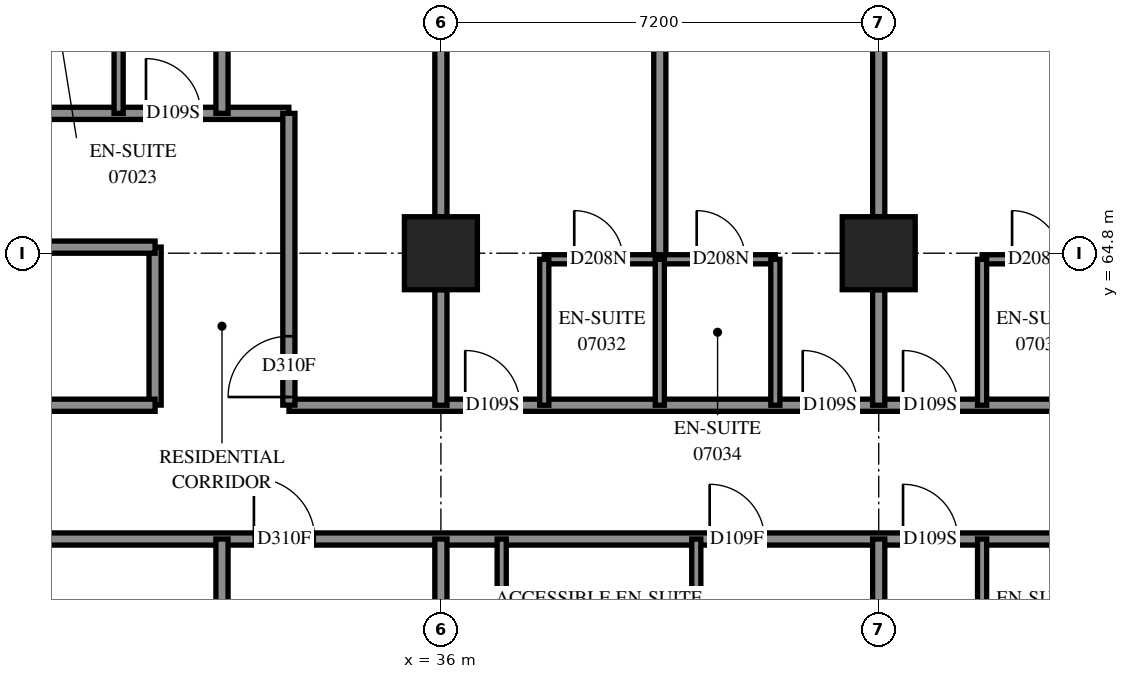
"""IFC4 building model, lengths in metres.
Left out: names, types, materials, properties, quantities, classifications, styles, units other than length and angle.
Written with IfcOpenShell. Run it as: python <this file> out.ifc"""

import sys

from ifc_helpers import new_model, si_unit, direction, frame, frame_2d, origin, origin_2d, place, context, subcontext, project, spatial, rectangle, extrude, element, fill, save


model = new_model("IFC4")
c1 = context("Model", 3, precision=1e-05, world=origin(), true_north=direction((0.0, 1.0)))
c2 = subcontext(c1, "Body", "Model", "MODEL_VIEW")
j1 = project(units=[si_unit("LENGTHUNIT", "METRE"), si_unit("PLANEANGLEUNIT", "RADIAN")], contexts=[c1])
p1 = place(None, origin())
s1 = spatial("IfcSite", under=j1, at=p1, CompositionType="ELEMENT")
p2 = place(p1, origin())
s2 = spatial("IfcBuilding", under=s1, at=p2, CompositionType="ELEMENT")
p3 = place(p2, frame((0.0, 0.0, 30.4)))
s3 = spatial("IfcBuildingStorey", under=s2, at=p3, CompositionType="ELEMENT", Elevation=30.4)
for number, where, z_axis, x_axis in (
    (1, (36.0, 64.8, 0.0), (0.0, 0.0, 1.0), (1.0, 0.0, 0.0)),
    (2, (43.2, 64.8, 0.0), (0.0, 0.0, 1.0), (1.0, 0.0, 0.0)),
):
    element("IfcColumn", number, at=place(p3, frame(where, z_axis=z_axis, x_axis=x_axis)), inside=s3, PredefinedType="COLUMN", context=c2, shape_type="SweptSolid", body=[
        extrude(rectangle(XDim=1.2, YDim=1.2, at=origin_2d()), origin(), (0.0, 0.0, 1.0), 3.1),
    ])
p4 = place(p3, frame((28.8, 60.1, 0.0), z_axis=(0.0, 0.0, 1.0), x_axis=(1.0, 0.0, 0.0)))
e3 = element("IfcWall", 3, at=p4, inside=s3, PredefinedType="PARTITIONING", context=c2, shape_type="SweptSolid", body=[
    extrude(rectangle(XDim=24.1, YDim=0.2, at=frame_2d((12.05, 0.0))), origin(), (0.0, 0.0, 1.0), 3.1),
])
p5 = place(p4, frame((4.125, 0.0, 0.0)))
e4 = element("IfcOpeningElement", 4, at=p5, cuts=e3, PredefinedType="OPENING", context=c2, shape_type="SweptSolid", body=[
    extrude(rectangle(XDim=1.0, YDim=2.1, at=frame_2d((0.5, 1.05))), frame((0.0, 0.11, 0.0), z_axis=(0.0, -1.0, 0.0), x_axis=(1.0, 0.0, 0.0)), (0.0, 0.0, 1.0), 0.22),
])
p6 = place(p4, frame((11.62, 0.0, 0.0)))
e5 = element("IfcOpeningElement", 5, at=p6, cuts=e3, PredefinedType="OPENING", context=c2, shape_type="SweptSolid", body=[
    extrude(rectangle(XDim=0.9, YDim=2.1, at=frame_2d((0.45, 1.05))), frame((0.0, 0.11, 0.0), z_axis=(0.0, -1.0, 0.0), x_axis=(1.0, 0.0, 0.0)), (0.0, 0.0, 1.0), 0.22),
])
p7 = place(p4, frame((14.8, 0.0, 0.0)))
e6 = element("IfcOpeningElement", 6, at=p7, cuts=e3, PredefinedType="OPENING", context=c2, shape_type="SweptSolid", body=[
    extrude(rectangle(XDim=0.9, YDim=2.1, at=frame_2d((0.45, 1.05))), frame((0.0, 0.11, 0.0), z_axis=(0.0, -1.0, 0.0), x_axis=(1.0, 0.0, 0.0)), (0.0, 0.0, 1.0), 0.22),
])
p8 = place(p4, frame((18.835, 0.0, 0.0)))
e7 = element("IfcOpeningElement", 7, at=p8, cuts=e3, PredefinedType="OPENING", context=c2, shape_type="SweptSolid", body=[
    extrude(rectangle(XDim=1.0, YDim=2.1, at=frame_2d((0.5, 1.05))), frame((0.0, 0.11, 0.0), z_axis=(0.0, -1.0, 0.0), x_axis=(1.0, 0.0, 0.0)), (0.0, 0.0, 1.0), 0.22),
])
p9 = place(p4, frame((22.854, 0.0, 0.0)))
e8 = element("IfcOpeningElement", 8, at=p9, cuts=e3, PredefinedType="OPENING", context=c2, shape_type="SweptSolid", body=[
    extrude(rectangle(XDim=1.0, YDim=2.1, at=frame_2d((0.5, 1.05))), frame((0.0, 0.11, 0.0), z_axis=(0.0, -1.0, 0.0), x_axis=(1.0, 0.0, 0.0)), (0.0, 0.0, 1.0), 0.22),
])
p10 = place(p3, frame((33.502, 62.3, 0.0), z_axis=(0.0, 0.0, 1.0), x_axis=(1.0, 0.0, 0.0)))
e9 = element("IfcWall", 9, at=p10, inside=s3, PredefinedType="PARTITIONING", context=c2, shape_type="SweptSolid", body=[
    extrude(rectangle(XDim=20.998, YDim=0.2, at=frame_2d((10.499, 0.0))), origin(), (0.0, 0.0, 1.0), 3.1),
])
p11 = place(p10, frame((2.898, 0.0, 0.0)))
e10 = element("IfcOpeningElement", 10, at=p11, cuts=e9, PredefinedType="OPENING", context=c2, shape_type="SweptSolid", body=[
    extrude(rectangle(XDim=0.9, YDim=2.1, at=frame_2d((0.45, 1.05))), frame((0.0, 0.11, 0.0), z_axis=(0.0, -1.0, 0.0), x_axis=(1.0, 0.0, 0.0)), (0.0, 0.0, 1.0), 0.22),
])
p12 = place(p10, frame((8.448, 0.0, 0.0)))
e11 = element("IfcOpeningElement", 11, at=p12, cuts=e9, PredefinedType="OPENING", context=c2, shape_type="SweptSolid", body=[
    extrude(rectangle(XDim=0.9, YDim=2.1, at=frame_2d((0.45, 1.05))), frame((0.0, 0.11, 0.0), z_axis=(0.0, -1.0, 0.0), x_axis=(1.0, 0.0, 0.0)), (0.0, 0.0, 1.0), 0.22),
])
p13 = place(p10, frame((10.098, 0.0, 0.0)))
e12 = element("IfcOpeningElement", 12, at=p13, cuts=e9, PredefinedType="OPENING", context=c2, shape_type="SweptSolid", body=[
    extrude(rectangle(XDim=0.9, YDim=2.1, at=frame_2d((0.45, 1.05))), frame((0.0, 0.11, 0.0), z_axis=(0.0, -1.0, 0.0), x_axis=(1.0, 0.0, 0.0)), (0.0, 0.0, 1.0), 0.22),
])
p14 = place(p10, frame((15.648, 0.0, 0.0)))
e13 = element("IfcOpeningElement", 13, at=p14, cuts=e9, PredefinedType="OPENING", context=c2, shape_type="SweptSolid", body=[
    extrude(rectangle(XDim=0.9, YDim=2.1, at=frame_2d((0.45, 1.05))), frame((0.0, 0.11, 0.0), z_axis=(0.0, -1.0, 0.0), x_axis=(1.0, 0.0, 0.0)), (0.0, 0.0, 1.0), 0.22),
])
p15 = place(p10, frame((17.298, 0.0, 0.0)))
e14 = element("IfcOpeningElement", 14, at=p15, cuts=e9, PredefinedType="OPENING", context=c2, shape_type="SweptSolid", body=[
    extrude(rectangle(XDim=0.9, YDim=2.1, at=frame_2d((0.45, 1.05))), frame((0.0, 0.11, 0.0), z_axis=(0.0, -1.0, 0.0), x_axis=(1.0, 0.0, 0.0)), (0.0, 0.0, 1.0), 0.22),
])
p16 = place(p3, frame((21.602, 67.1, 0.0), z_axis=(0.0, 0.0, 1.0), x_axis=(1.0, 0.0, 0.0)))
e15 = element("IfcWall", 15, at=p16, inside=s3, PredefinedType="PARTITIONING", context=c2, shape_type="SweptSolid", body=[
    extrude(rectangle(XDim=11.898, YDim=0.2, at=frame_2d((5.949, 0.0))), origin(), (0.0, 0.0, 1.0), 3.1),
])
p17 = place(p16, frame((1.798, 0.0, 0.0)))
e16 = element("IfcOpeningElement", 16, at=p17, cuts=e15, PredefinedType="OPENING", context=c2, shape_type="SweptSolid", body=[
    extrude(rectangle(XDim=1.0, YDim=2.1, at=frame_2d((0.5, 1.05))), frame((0.0, 0.11, 0.0), z_axis=(0.0, -1.0, 0.0), x_axis=(1.0, 0.0, 0.0)), (0.0, 0.0, 1.0), 0.22),
])
p18 = place(p16, frame((3.998, 0.0, 0.0)))
e17 = element("IfcOpeningElement", 17, at=p18, cuts=e15, PredefinedType="OPENING", context=c2, shape_type="SweptSolid", body=[
    extrude(rectangle(XDim=0.9, YDim=2.1, at=frame_2d((0.45, 1.05))), frame((0.0, 0.11, 0.0), z_axis=(0.0, -1.0, 0.0), x_axis=(1.0, 0.0, 0.0)), (0.0, 0.0, 1.0), 0.22),
])
p19 = place(p16, frame((9.548, 0.0, 0.0)))
e18 = element("IfcOpeningElement", 18, at=p19, cuts=e15, PredefinedType="OPENING", context=c2, shape_type="SweptSolid", body=[
    extrude(rectangle(XDim=0.9, YDim=2.1, at=frame_2d((0.45, 1.05))), frame((0.0, 0.11, 0.0), z_axis=(0.0, -1.0, 0.0), x_axis=(1.0, 0.0, 0.0)), (0.0, 0.0, 1.0), 0.22),
])
p20 = place(p3, frame((39.6, 64.7, 0.0), z_axis=(0.0, 0.0, 1.0), x_axis=(0.0, 1.0, 0.0)))
e19 = element("IfcWall", 19, at=p20, inside=s3, PredefinedType="PARTITIONING", context=c2, shape_type="SweptSolid", body=[
    extrude(rectangle(XDim=8.052, YDim=0.2, at=frame_2d((4.026, 0.0))), origin(), (0.0, 0.0, 1.0), 3.1),
])
for number, where, z_axis, x_axis in (
    (20, (36.0, 65.4, 0.0), (0.0, 0.0, 1.0), (0.0, 1.0, 0.0)),
    (21, (43.2, 65.4, 0.0), (0.0, 0.0, 1.0), (0.0, 1.0, 0.0)),
):
    element("IfcWall", number, at=place(p3, frame(where, z_axis=z_axis, x_axis=x_axis)), inside=s3, PredefinedType="PARTITIONING", context=c2, shape_type="SweptSolid", body=[
        extrude(rectangle(XDim=6.0, YDim=0.2, at=frame_2d((3.0, 0.0))), origin(), (0.0, 0.0, 1.0), 3.1),
    ])
p21 = place(p3, frame((32.4, 67.1, 0.0), z_axis=(0.0, 0.0, 1.0), x_axis=(0.0, 1.0, 0.0)))
e22 = element("IfcWall", 22, at=p21, inside=s3, PredefinedType="PARTITIONING", context=c2, shape_type="SweptSolid", body=[
    extrude(rectangle(XDim=5.684, YDim=0.2, at=frame_2d((2.842, 0.0))), origin(), (0.0, 0.0, 1.0), 3.1),
])
p22 = place(p3, frame((33.5, 62.302, 0.0), z_axis=(0.0, 0.0, 1.0), x_axis=(0.0, 1.0, 0.0)))
e23 = element("IfcWall", 23, at=p22, inside=s3, PredefinedType="PARTITIONING", context=c2, shape_type="SweptSolid", body=[
    extrude(rectangle(XDim=4.798, YDim=0.2, at=frame_2d((2.399, 0.0))), origin(), (0.0, 0.0, 1.0), 3.1),
])
p23 = place(p22, frame((0.133, 0.0, 0.0)))
e24 = element("IfcOpeningElement", 24, at=p23, cuts=e23, PredefinedType="OPENING", context=c2, shape_type="SweptSolid", body=[
    extrude(rectangle(XDim=1.0, YDim=2.1, at=frame_2d((0.5, 1.05))), frame((0.0, 0.11, 0.0), z_axis=(0.0, -1.0, 0.0), x_axis=(1.0, 0.0, 0.0)), (0.0, 0.0, 1.0), 0.22),
])
p24 = place(p3, frame((44.9, 64.7, 0.0), z_axis=(0.0, 0.0, 1.0), x_axis=(1.0, 0.0, 0.0)))
e25 = element("IfcWall", 25, at=p24, inside=s3, PredefinedType="PARTITIONING", context=c2, shape_type="SweptSolid", body=[
    extrude(rectangle(XDim=3.8, YDim=0.15, at=frame_2d((1.9, 0.0))), origin(), (0.0, 0.0, 1.0), 3.1),
])
p25 = place(p24, frame((0.493, 0.0, 0.0)))
e26 = element("IfcOpeningElement", 26, at=p25, cuts=e25, PredefinedType="OPENING", context=c2, shape_type="SweptSolid", body=[
    extrude(rectangle(XDim=0.8, YDim=2.1, at=frame_2d((0.4, 1.05))), frame((0.0, 0.085, 0.0), z_axis=(0.0, -1.0, 0.0), x_axis=(1.0, 0.0, 0.0)), (0.0, 0.0, 1.0), 0.17),
])
p26 = place(p24, frame((2.507, 0.0, 0.0)))
e27 = element("IfcOpeningElement", 27, at=p26, cuts=e25, PredefinedType="OPENING", context=c2, shape_type="SweptSolid", body=[
    extrude(rectangle(XDim=0.8, YDim=2.1, at=frame_2d((0.4, 1.05))), frame((0.0, 0.085, 0.0), z_axis=(0.0, -1.0, 0.0), x_axis=(1.0, 0.0, 0.0)), (0.0, 0.0, 1.0), 0.17),
])
p27 = place(p3, frame((37.7, 64.7, 0.0), z_axis=(0.0, 0.0, 1.0), x_axis=(1.0, 0.0, 0.0)))
e28 = element("IfcWall", 28, at=p27, inside=s3, PredefinedType="PARTITIONING", context=c2, shape_type="SweptSolid", body=[
    extrude(rectangle(XDim=3.8, YDim=0.15, at=frame_2d((1.9, 0.0))), origin(), (0.0, 0.0, 1.0), 3.1),
])
p28 = place(p27, frame((0.493, 0.0, 0.0)))
e29 = element("IfcOpeningElement", 29, at=p28, cuts=e28, PredefinedType="OPENING", context=c2, shape_type="SweptSolid", body=[
    extrude(rectangle(XDim=0.8, YDim=2.1, at=frame_2d((0.4, 1.05))), frame((0.0, 0.085, 0.0), z_axis=(0.0, -1.0, 0.0), x_axis=(1.0, 0.0, 0.0)), (0.0, 0.0, 1.0), 0.17),
])
p29 = place(p27, frame((2.507, 0.0, 0.0)))
e30 = element("IfcOpeningElement", 30, at=p29, cuts=e28, PredefinedType="OPENING", context=c2, shape_type="SweptSolid", body=[
    extrude(rectangle(XDim=0.8, YDim=2.1, at=frame_2d((0.4, 1.05))), frame((0.0, 0.085, 0.0), z_axis=(0.0, -1.0, 0.0), x_axis=(1.0, 0.0, 0.0)), (0.0, 0.0, 1.0), 0.17),
])
p30 = place(p3, frame((32.4, 56.95, 0.0), z_axis=(0.0, 0.0, 1.0), x_axis=(0.0, 1.0, 0.0)))
e31 = element("IfcWall", 31, at=p30, inside=s3, PredefinedType="PARTITIONING", context=c2, shape_type="SweptSolid", body=[
    extrude(rectangle(XDim=3.15, YDim=0.2, at=frame_2d((1.575, 0.0))), origin(), (0.0, 0.0, 1.0), 3.1),
])
p31 = place(p3, frame((31.3, 62.302, 0.0), z_axis=(0.0, 0.0, 1.0), x_axis=(0.0, 1.0, 0.0)))
e32 = element("IfcWall", 32, at=p31, inside=s3, PredefinedType="PARTITIONING", context=c2, shape_type="SweptSolid", body=[
    extrude(rectangle(XDim=2.598, YDim=0.2, at=frame_2d((1.299, 0.0))), origin(), (0.0, 0.0, 1.0), 3.1),
])
p32 = place(p3, frame((28.802, 62.3, 0.0), z_axis=(0.0, 0.0, 1.0), x_axis=(1.0, 0.0, 0.0)))
e33 = element("IfcWall", 33, at=p32, inside=s3, PredefinedType="PARTITIONING", context=c2, shape_type="SweptSolid", body=[
    extrude(rectangle(XDim=2.498, YDim=0.2, at=frame_2d((1.249, 0.0))), origin(), (0.0, 0.0, 1.0), 3.1),
])
for number, where, z_axis, x_axis in (
    (34, (30.7, 67.1, 0.0), (0.0, 0.0, 1.0), (0.0, 1.0, 0.0)),
    (35, (37.7, 62.3, 0.0), (0.0, 0.0, 1.0), (0.0, 1.0, 0.0)),
    (36, (39.6, 62.3, 0.0), (0.0, 0.0, 1.0), (0.0, 1.0, 0.0)),
    (37, (41.5, 62.3, 0.0), (0.0, 0.0, 1.0), (0.0, 1.0, 0.0)),
    (38, (44.9, 62.3, 0.0), (0.0, 0.0, 1.0), (0.0, 1.0, 0.0)),
    (39, (40.2, 57.7, 0.0), (0.0, 0.0, 1.0), (0.0, 1.0, 0.0)),
    (40, (37.0, 57.7, 0.0), (0.0, 0.0, 1.0), (0.0, 1.0, 0.0)),
    (41, (44.9, 57.7, 0.0), (0.0, 0.0, 1.0), (0.0, 1.0, 0.0)),
):
    element("IfcWall", number, at=place(p3, frame(where, z_axis=z_axis, x_axis=x_axis)), inside=s3, PredefinedType="PARTITIONING", context=c2, shape_type="SweptSolid", body=[
        extrude(rectangle(XDim=2.4, YDim=0.15, at=frame_2d((1.2, 0.0))), origin(), (0.0, 0.0, 1.0), 3.1),
    ])
for number, where, z_axis, x_axis in (
    (42, (36.0, 62.3, 0.0), (0.0, 0.0, 1.0), (0.0, 1.0, 0.0)),
    (43, (43.2, 62.3, 0.0), (0.0, 0.0, 1.0), (0.0, 1.0, 0.0)),
    (44, (29.4, 64.9, 0.0), (0.0, 0.0, 1.0), (1.0, 0.0, 0.0)),
    (45, (36.0, 58.2, 0.0), (0.0, 0.0, 1.0), (0.0, 1.0, 0.0)),
    (46, (43.2, 58.2, 0.0), (0.0, 0.0, 1.0), (0.0, 1.0, 0.0)),
):
    element("IfcWall", number, at=place(p3, frame(where, z_axis=z_axis, x_axis=x_axis)), inside=s3, PredefinedType="PARTITIONING", context=c2, shape_type="SweptSolid", body=[
        extrude(rectangle(XDim=1.9, YDim=0.2, at=frame_2d((0.95, 0.0))), origin(), (0.0, 0.0, 1.0), 3.1),
    ])
p33 = place(p19, origin())
e47 = element("IfcDoor", 47, at=p33, inside=s3, OperationType="SINGLE_SWING_RIGHT", PredefinedType="DOOR", context=c2, shape_type="SweptSolid", body=[
    extrude(rectangle(XDim=0.9, YDim=2.1, at=frame_2d((0.45, 1.05))), frame((0.0, 0.025, 0.0), z_axis=(0.0, -1.0, 0.0), x_axis=(1.0, 0.0, 0.0)), (0.0, 0.0, 1.0), 0.05),
])
fill(e18, e47)
p34 = place(p5, origin())
e48 = element("IfcDoor", 48, at=p34, inside=s3, OperationType="SINGLE_SWING_RIGHT", PredefinedType="DOOR", context=c2, shape_type="SweptSolid", body=[
    extrude(rectangle(XDim=1.0, YDim=2.1, at=frame_2d((0.5, 1.05))), frame((0.0, 0.025, 0.0), z_axis=(0.0, -1.0, 0.0), x_axis=(1.0, 0.0, 0.0)), (0.0, 0.0, 1.0), 0.05),
])
fill(e4, e48)
p35 = place(p6, origin())
e49 = element("IfcDoor", 49, at=p35, inside=s3, OperationType="SINGLE_SWING_LEFT", PredefinedType="DOOR", context=c2, shape_type="SweptSolid", body=[
    extrude(rectangle(XDim=0.9, YDim=2.1, at=frame_2d((0.45, 1.05))), frame((0.0, 0.025, 0.0), z_axis=(0.0, -1.0, 0.0), x_axis=(1.0, 0.0, 0.0)), (0.0, 0.0, 1.0), 0.05),
])
fill(e5, e49)
p36 = place(p7, origin())
e50 = element("IfcDoor", 50, at=p36, inside=s3, OperationType="SINGLE_SWING_LEFT", PredefinedType="DOOR", context=c2, shape_type="SweptSolid", body=[
    extrude(rectangle(XDim=0.9, YDim=2.1, at=frame_2d((0.45, 1.05))), frame((0.0, 0.025, 0.0), z_axis=(0.0, -1.0, 0.0), x_axis=(1.0, 0.0, 0.0)), (0.0, 0.0, 1.0), 0.05),
])
fill(e6, e50)
p37 = place(p23, origin())
e51 = element("IfcDoor", 51, at=p37, inside=s3, OperationType="SINGLE_SWING_LEFT", PredefinedType="DOOR", context=c2, shape_type="SweptSolid", body=[
    extrude(rectangle(XDim=1.0, YDim=2.1, at=frame_2d((0.5, 1.05))), frame((0.0, 0.025, 0.0), z_axis=(0.0, -1.0, 0.0), x_axis=(1.0, 0.0, 0.0)), (0.0, 0.0, 1.0), 0.05),
])
fill(e24, e51)
p38 = place(p11, origin())
e52 = element("IfcDoor", 52, at=p38, inside=s3, OperationType="SINGLE_SWING_RIGHT", PredefinedType="DOOR", context=c2, shape_type="SweptSolid", body=[
    extrude(rectangle(XDim=0.9, YDim=2.1, at=frame_2d((0.45, 1.05))), frame((0.0, 0.025, 0.0), z_axis=(0.0, -1.0, 0.0), x_axis=(1.0, 0.0, 0.0)), (0.0, 0.0, 1.0), 0.05),
])
fill(e10, e52)
p39 = place(p28, origin())
e53 = element("IfcDoor", 53, at=p39, inside=s3, OperationType="SINGLE_SWING_RIGHT", PredefinedType="DOOR", context=c2, shape_type="SweptSolid", body=[
    extrude(rectangle(XDim=0.8, YDim=2.1, at=frame_2d((0.4, 1.05))), frame((0.0, 0.025, 0.0), z_axis=(0.0, -1.0, 0.0), x_axis=(1.0, 0.0, 0.0)), (0.0, 0.0, 1.0), 0.05),
])
fill(e29, e53)
p40 = place(p12, origin())
e54 = element("IfcDoor", 54, at=p40, inside=s3, OperationType="SINGLE_SWING_LEFT", PredefinedType="DOOR", context=c2, shape_type="SweptSolid", body=[
    extrude(rectangle(XDim=0.9, YDim=2.1, at=frame_2d((0.45, 1.05))), frame((0.0, 0.025, 0.0), z_axis=(0.0, -1.0, 0.0), x_axis=(1.0, 0.0, 0.0)), (0.0, 0.0, 1.0), 0.05),
])
fill(e11, e54)
p41 = place(p29, origin())
e55 = element("IfcDoor", 55, at=p41, inside=s3, OperationType="SINGLE_SWING_RIGHT", PredefinedType="DOOR", context=c2, shape_type="SweptSolid", body=[
    extrude(rectangle(XDim=0.8, YDim=2.1, at=frame_2d((0.4, 1.05))), frame((0.0, 0.025, 0.0), z_axis=(0.0, -1.0, 0.0), x_axis=(1.0, 0.0, 0.0)), (0.0, 0.0, 1.0), 0.05),
])
fill(e30, e55)
p42 = place(p13, origin())
e56 = element("IfcDoor", 56, at=p42, inside=s3, OperationType="SINGLE_SWING_RIGHT", PredefinedType="DOOR", context=c2, shape_type="SweptSolid", body=[
    extrude(rectangle(XDim=0.9, YDim=2.1, at=frame_2d((0.45, 1.05))), frame((0.0, 0.025, 0.0), z_axis=(0.0, -1.0, 0.0), x_axis=(1.0, 0.0, 0.0)), (0.0, 0.0, 1.0), 0.05),
])
fill(e12, e56)
p43 = place(p25, origin())
e57 = element("IfcDoor", 57, at=p43, inside=s3, OperationType="SINGLE_SWING_RIGHT", PredefinedType="DOOR", context=c2, shape_type="SweptSolid", body=[
    extrude(rectangle(XDim=0.8, YDim=2.1, at=frame_2d((0.4, 1.05))), frame((0.0, 0.025, 0.0), z_axis=(0.0, -1.0, 0.0), x_axis=(1.0, 0.0, 0.0)), (0.0, 0.0, 1.0), 0.05),
])
fill(e26, e57)
save(model, sys.argv[1])
